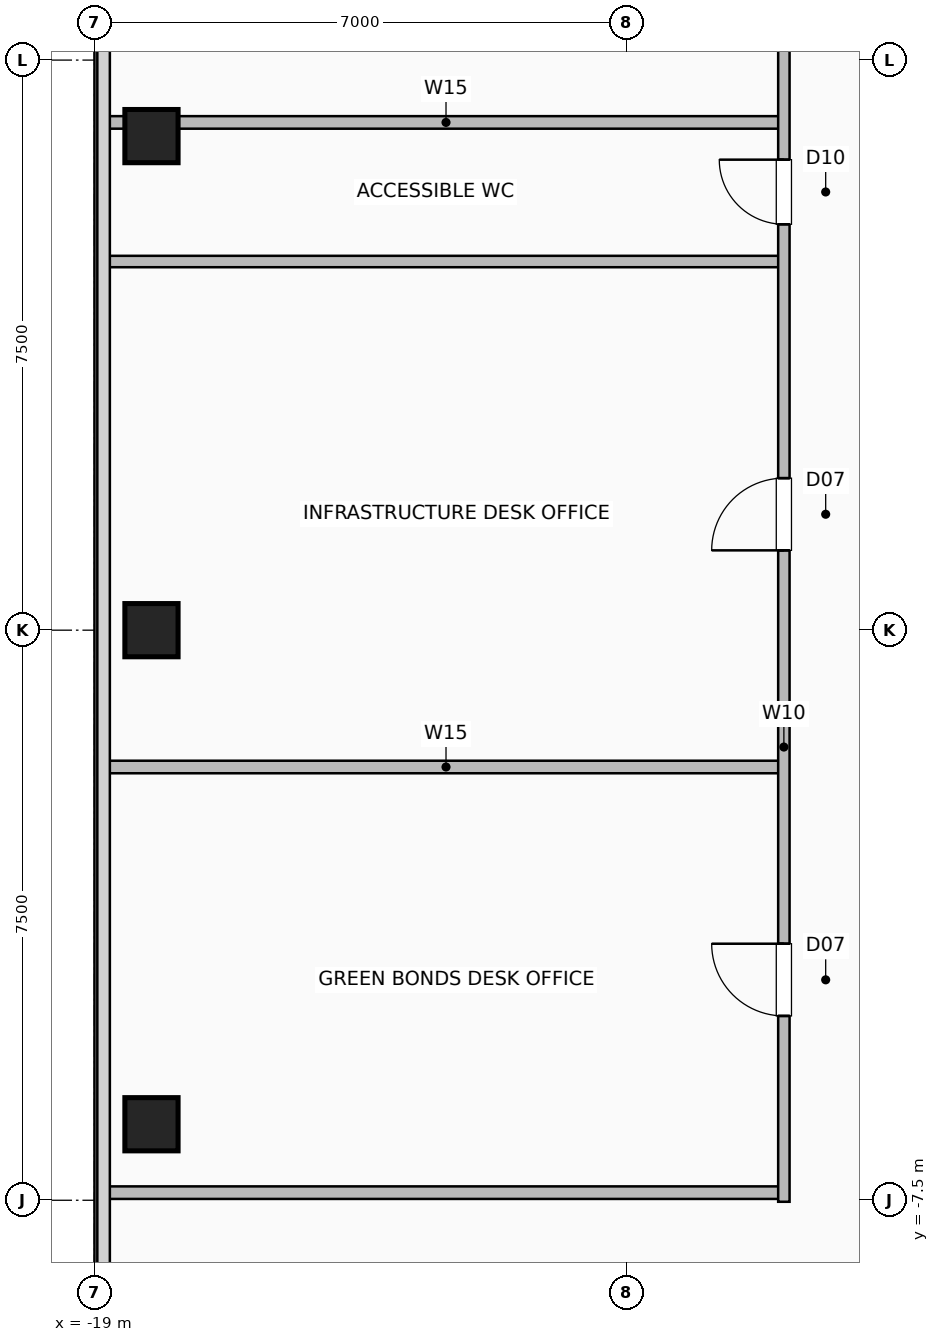
"""IFC4 building model, lengths in metres.
Left out: names, types, materials, properties, quantities, classifications, styles, units other than length and angle.
Written with IfcOpenShell. Run it as: python <this file> out.ifc"""

import sys

from ifc_helpers import new_model, si_unit, direction, frame, frame_2d, origin, origin_2d, place, context, subcontext, project, spatial, rectangle, hollow_rectangle, extrude, element, fill, save


model = new_model("IFC4")
c1 = context("Model", 3, precision=1e-05, world=origin(), true_north=direction((0.0, 1.0)))
c2 = subcontext(c1, "Body", "Model", "MODEL_VIEW")
j1 = project(units=[si_unit("LENGTHUNIT", "METRE"), si_unit("PLANEANGLEUNIT", "RADIAN")], contexts=[c1])
p1 = place(None, origin())
s1 = spatial("IfcSite", under=j1, at=p1, CompositionType="ELEMENT")
p2 = place(p1, origin())
s2 = spatial("IfcBuilding", under=s1, at=p2, CompositionType="ELEMENT")
p3 = place(p2, frame((0.0, 0.0, 275.6)))
s3 = spatial("IfcBuildingStorey", under=s2, at=p3, CompositionType="ELEMENT", Elevation=275.6)
for number, where, z_axis, x_axis in (
    (1, (-18.25, -6.5, 0.0), (0.0, 0.0, 1.0), (1.0, 0.0, 0.0)),
    (2, (-18.25, 0.0, 0.0), (0.0, 0.0, 1.0), (1.0, 0.0, 0.0)),
    (3, (-18.25, 6.5, 0.0), (0.0, 0.0, 1.0), (1.0, 0.0, 0.0)),
):
    element("IfcColumn", number, at=place(p3, frame(where, z_axis=z_axis, x_axis=x_axis)), inside=s3, PredefinedType="COLUMN", context=c2, shape_type="SweptSolid", body=[
        extrude(hollow_rectangle(XDim=0.7, YDim=0.7, WallThickness=0.035, at=origin_2d()), origin(), (0.0, 0.0, 1.0), 3.6),
    ])
for number, where, z_axis, x_axis in (
    (4, (-18.82, 6.68, 0.0), (0.0, 0.0, 1.0), (1.0, 0.0, 0.0)),
    (5, (-18.82, -7.4, 0.0), (0.0, 0.0, 1.0), (1.0, 0.0, 0.0)),
    (6, (-18.82, -1.8, 0.0), (0.0, 0.0, 1.0), (1.0, 0.0, 0.0)),
):
    element("IfcWall", number, at=place(p3, frame(where, z_axis=z_axis, x_axis=x_axis)), inside=s3, PredefinedType="PLUMBINGWALL", context=c2, shape_type="SweptSolid", body=[
        extrude(rectangle(XDim=8.89, YDim=0.165, at=frame_2d((4.445, 0.0))), origin(), (0.0, 0.0, 1.0), 3.36),
    ])
p4 = place(p3, frame((-18.82, 4.85, 0.0), z_axis=(0.0, 0.0, 1.0), x_axis=(1.0, 0.0, 0.0)))
e7 = element("IfcWall", 7, at=p4, inside=s3, PredefinedType="PARTITIONING", context=c2, shape_type="SweptSolid", body=[
    extrude(rectangle(XDim=8.89, YDim=0.15, at=frame_2d((4.445, 0.0))), origin(), (0.0, 0.0, 1.0), 3.36),
])
p5 = place(p3, frame((-9.93, -7.52, 0.0), z_axis=(0.0, 0.0, 1.0), x_axis=(0.0, 1.0, 0.0)))
e8 = element("IfcWall", 8, at=p5, inside=s3, PredefinedType="PARTITIONING", context=c2, shape_type="SweptSolid", body=[
    extrude(rectangle(XDim=20.09, YDim=0.15, at=frame_2d((10.045, 0.0))), origin(), (0.0, 0.0, 1.0), 3.36),
])
p6 = place(p5, frame((2.445, 0.0, 0.0)))
e9 = element("IfcOpeningElement", 9, at=p6, cuts=e8, PredefinedType="OPENING", context=c2, shape_type="SweptSolid", body=[
    extrude(rectangle(XDim=0.95, YDim=2.06, at=frame_2d((0.475, 1.03))), frame((0.0, 0.085, 0.0), z_axis=(0.0, -1.0, 0.0), x_axis=(1.0, 0.0, 0.0)), (0.0, 0.0, 1.0), 0.17),
])
p7 = place(p5, frame((8.57, 0.0, 0.0)))
e10 = element("IfcOpeningElement", 10, at=p7, cuts=e8, PredefinedType="OPENING", context=c2, shape_type="SweptSolid", body=[
    extrude(rectangle(XDim=0.95, YDim=2.06, at=frame_2d((0.475, 1.03))), frame((0.0, 0.085, 0.0), z_axis=(0.0, -1.0, 0.0), x_axis=(1.0, 0.0, 0.0)), (0.0, 0.0, 1.0), 0.17),
])
p8 = place(p5, frame((12.86, 0.0, 0.0)))
e11 = element("IfcOpeningElement", 11, at=p8, cuts=e8, PredefinedType="OPENING", context=c2, shape_type="SweptSolid", body=[
    extrude(rectangle(XDim=0.85, YDim=2.05, at=frame_2d((0.425, 1.025))), frame((0.0, 0.085, 0.0), z_axis=(0.0, -1.0, 0.0), x_axis=(1.0, 0.0, 0.0)), (0.0, 0.0, 1.0), 0.17),
])
p9 = place(p5, frame((16.61, 0.0, 0.0)))
e12 = element("IfcOpeningElement", 12, at=p9, cuts=e8, PredefinedType="OPENING", context=c2, shape_type="SweptSolid", body=[
    extrude(rectangle(XDim=0.95, YDim=2.06, at=frame_2d((0.475, 1.03))), frame((0.0, 0.085, 0.0), z_axis=(0.0, -1.0, 0.0), x_axis=(1.0, 0.0, 0.0)), (0.0, 0.0, 1.0), 0.17),
])
p10 = place(p6, origin())
e13 = element("IfcDoor", 13, at=p10, inside=s3, OperationType="SINGLE_SWING_RIGHT", PredefinedType="DOOR", context=c2, shape_type="SweptSolid", body=[
    extrude(rectangle(XDim=0.95, YDim=2.06, at=frame_2d((0.475, 1.03))), frame((0.0, 0.025, 0.0), z_axis=(0.0, -1.0, 0.0), x_axis=(1.0, 0.0, 0.0)), (0.0, 0.0, 1.0), 0.05),
])
fill(e9, e13)
p11 = place(p7, origin())
e14 = element("IfcDoor", 14, at=p11, inside=s3, OperationType="SINGLE_SWING_LEFT", PredefinedType="DOOR", context=c2, shape_type="SweptSolid", body=[
    extrude(rectangle(XDim=0.95, YDim=2.06, at=frame_2d((0.475, 1.03))), frame((0.0, 0.025, 0.0), z_axis=(0.0, -1.0, 0.0), x_axis=(1.0, 0.0, 0.0)), (0.0, 0.0, 1.0), 0.05),
])
fill(e10, e14)
p12 = place(p8, origin())
e15 = element("IfcDoor", 15, at=p12, inside=s3, OperationType="SINGLE_SWING_RIGHT", PredefinedType="DOOR", context=c2, shape_type="SweptSolid", body=[
    extrude(rectangle(XDim=0.85, YDim=2.05, at=frame_2d((0.425, 1.025))), frame((0.0, 0.025, 0.0), z_axis=(0.0, -1.0, 0.0), x_axis=(1.0, 0.0, 0.0)), (0.0, 0.0, 1.0), 0.05),
])
fill(e11, e15)
save(model, sys.argv[1])
